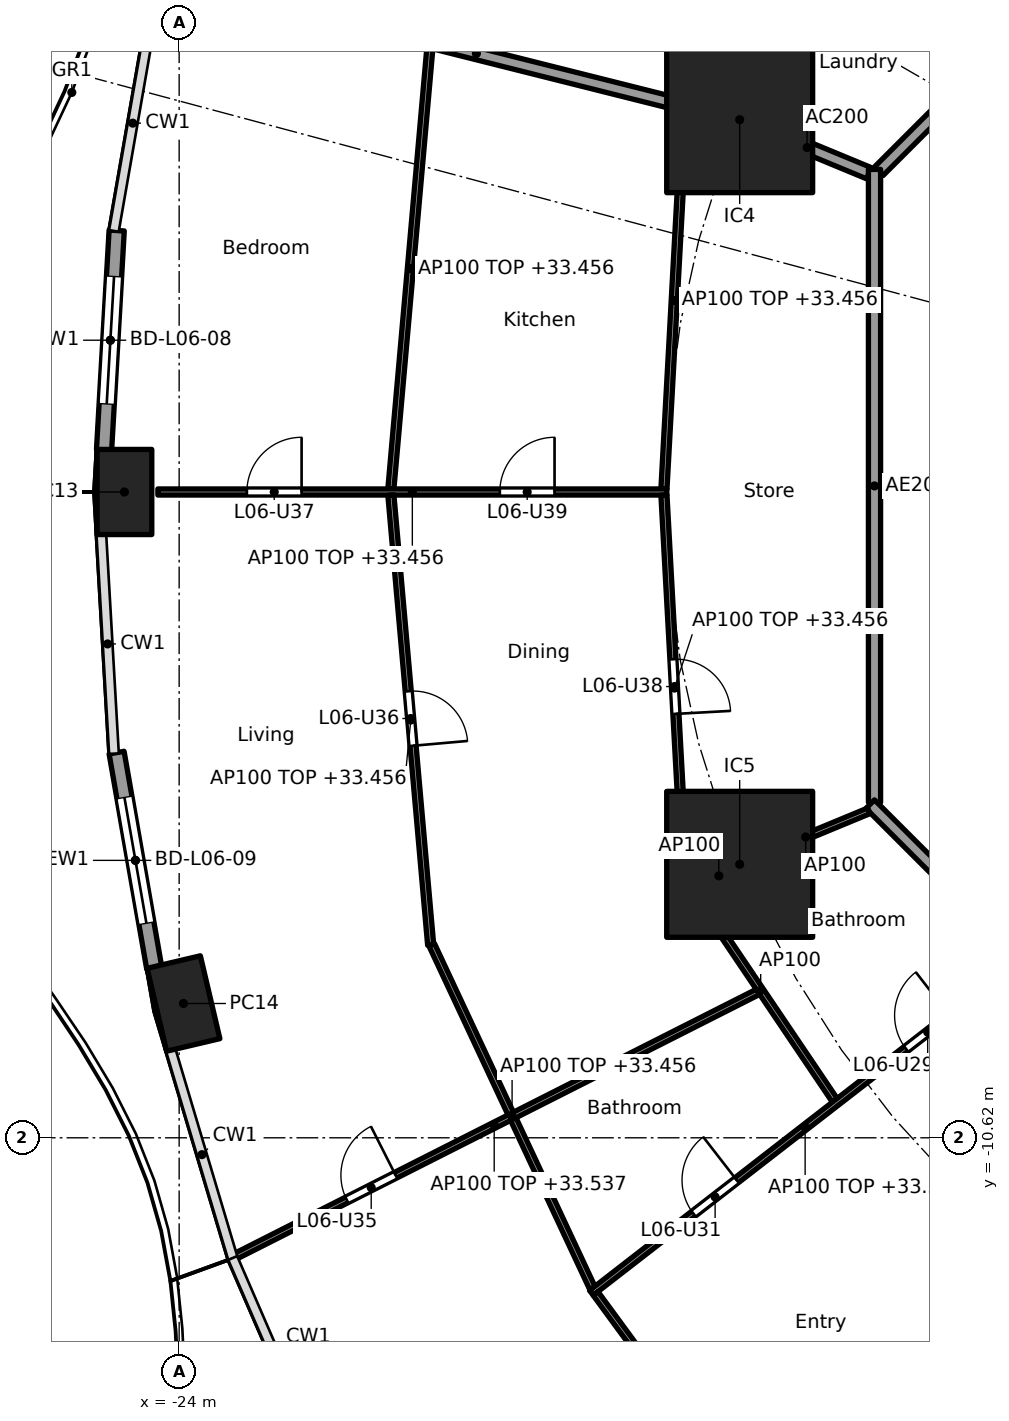
"""IFC4 building model, lengths in metres.
Left out: names, types, materials, properties, quantities, classifications, styles, units other than length and angle.
Written with IfcOpenShell. Run it as: python <this file> out.ifc"""

import sys

from ifc_helpers import new_model, si_unit, direction, frame, frame_2d, origin, origin_2d, place, context, subcontext, project, spatial, rectangle, hollow_rectangle, extrude, element, fill, save


model = new_model("IFC4")
c1 = context("Model", 3, precision=1e-05, world=origin(), true_north=direction((0.0, 1.0)))
c2 = subcontext(c1, "Body", "Model", "MODEL_VIEW")
j1 = project(units=[si_unit("LENGTHUNIT", "METRE"), si_unit("PLANEANGLEUNIT", "RADIAN")], contexts=[c1])
p1 = place(None, origin())
s1 = spatial("IfcSite", under=j1, at=p1, CompositionType="ELEMENT")
p2 = place(p1, origin())
s2 = spatial("IfcBuilding", under=s1, at=p2, CompositionType="ELEMENT")
p3 = place(p2, frame((0.0, 0.0, 30.7)))
s3 = spatial("IfcBuildingStorey", under=s2, at=p3, CompositionType="ELEMENT", Elevation=30.7)
for number, where, z_axis, x_axis in (
    (1, (-24.9, 0.0, 0.0), (0.0, 0.0, 1.0), (0.0, -1.0, 0.0)),
    (2, (-23.929, -8.412, 0.0), (0.0, 0.0, 1.0), (0.229, -0.973, 0.0)),
):
    element("IfcColumn", number, at=place(p3, frame(where, z_axis=z_axis, x_axis=x_axis)), inside=s3, PredefinedType="COLUMN", context=c2, shape_type="SweptSolid", body=[
        extrude(hollow_rectangle(XDim=1.4, YDim=0.9, WallThickness=0.05, at=origin_2d()), origin(), (0.0, 0.0, 1.0), 3.7),
    ])
for number, where, z_axis, x_axis in (
    (3, (-14.782, 6.123, 0.0), (0.0, 0.0, 1.0), (1.0, 0.0, 0.0)),
    (4, (-14.782, -6.123, 0.0), (0.0, 0.0, 1.0), (1.0, 0.0, 0.0)),
):
    element("IfcColumn", number, at=place(p3, frame(where, z_axis=z_axis, x_axis=x_axis)), inside=s3, PredefinedType="COLUMN", context=c2, shape_type="SweptSolid", body=[
        extrude(rectangle(XDim=2.4, YDim=2.4, at=origin_2d()), origin(), (0.0, 0.0, 1.0), 3.7),
    ])
p4 = place(p3, frame((-25.235, 0.692, 0.0), z_axis=(0.0, 0.0, 1.0), x_axis=(0.057478727308, 0.998346731305, 0.0)))
e5 = element("IfcWall", 5, at=p4, inside=s3, PredefinedType="SOLIDWALL", context=c2, shape_type="SweptSolid", body=[
    extrude(rectangle(XDim=3.615, YDim=0.25, at=frame_2d((1.807, 0.0))), origin(), (0.0, 0.0, 1.0), 3.44),
])
p5 = place(p4, frame((0.757, 0.0, 0.0)))
e6 = element("IfcOpeningElement", 6, at=p5, cuts=e5, PredefinedType="OPENING", context=c2, shape_type="SweptSolid", body=[
    extrude(rectangle(XDim=2.1, YDim=2.4, at=frame_2d((1.05, 1.2))), frame((0.0, 0.135, 0.0), z_axis=(0.0, -1.0, 0.0), x_axis=(1.0, 0.0, 0.0)), (0.0, 0.0, 1.0), 0.27),
])
p6 = place(p3, frame((-24.409, -7.83, 0.0), z_axis=(0.0, 0.0, 1.0), x_axis=(-0.172217377323, 0.98505897029, 0.0)))
e7 = element("IfcWall", 7, at=p6, inside=s3, PredefinedType="SOLIDWALL", context=c2, shape_type="SweptSolid", body=[
    extrude(rectangle(XDim=3.598, YDim=0.25, at=frame_2d((1.799, 0.0))), origin(), (0.0, 0.0, 1.0), 3.44),
])
p7 = place(p6, frame((0.749, 0.0, 0.0)))
e8 = element("IfcOpeningElement", 8, at=p7, cuts=e7, PredefinedType="OPENING", context=c2, shape_type="SweptSolid", body=[
    extrude(rectangle(XDim=2.1, YDim=2.4, at=frame_2d((1.05, 1.2))), frame((0.0, 0.135, 0.0), z_axis=(0.0, -1.0, 0.0), x_axis=(1.0, 0.0, 0.0)), (0.0, 0.0, 1.0), 0.27),
])
p8 = place(p3, frame((-12.657, 5.243, 0.0), z_axis=(0.0, 0.0, 1.0), x_axis=(-0.923885664896, 0.382668627144, 0.0)))
e9 = element("IfcWall", 9, at=p8, inside=s3, PredefinedType="PARTITIONING", context=c2, shape_type="SweptSolid", body=[
    extrude(rectangle(XDim=2.2, YDim=0.2, at=frame_2d((1.1, 0.0))), origin(), (0.0, 0.0, 1.0), 3.44),
])
p9 = place(p3, frame((-14.831, 6.135, 0.0), z_axis=(0.0, 0.0, 1.0), x_axis=(-0.969884949569, 0.243563512454, 0.0)))
e10 = element("IfcWall", 10, at=p9, inside=s3, PredefinedType="PARTITIONING", context=c2, shape_type="SweptSolid", body=[
    extrude(rectangle(XDim=8.829, YDim=0.2, at=frame_2d((4.415, 0.0))), origin(), (0.0, 0.0, 1.0), 2.756),
])
p10 = place(p3, frame((-5.275, 12.494, 0.0), z_axis=(0.0, 0.0, 1.0), x_axis=(-0.707106781187, -0.707106781187, 0.0)))
e11 = element("IfcWall", 11, at=p10, inside=s3, PredefinedType="PARTITIONING", context=c2, shape_type="SweptSolid", body=[
    extrude(rectangle(XDim=10.209, YDim=0.2, at=frame_2d((5.104, 0.0))), origin(), (0.0, 0.0, 1.0), 3.44),
])
p11 = place(p3, frame((-12.565, 5.304, 0.0), z_axis=(0.0, 0.0, 1.0), x_axis=(0.0, -1.0, 0.0)))
e12 = element("IfcWall", 12, at=p11, inside=s3, PredefinedType="PARTITIONING", context=c2, shape_type="SweptSolid", body=[
    extrude(rectangle(XDim=10.409, YDim=0.2, at=frame_2d((5.205, 0.0))), origin(), (0.0, 0.0, 1.0), 3.44),
])
p12 = place(p3, frame((-12.635, -5.134, 0.0), z_axis=(0.0, 0.0, 1.0), x_axis=(0.707106781187, -0.707106781187, 0.0)))
e13 = element("IfcWall", 13, at=p12, inside=s3, PredefinedType="PARTITIONING", context=c2, shape_type="SweptSolid", body=[
    extrude(rectangle(XDim=10.609, YDim=0.2, at=frame_2d((5.305, 0.0))), origin(), (0.0, 0.0, 1.0), 3.44),
])
p13 = place(p12, frame((4.804, 0.0, 0.0)))
e14 = element("IfcOpeningElement", 14, at=p13, cuts=e13, PredefinedType="OPENING", context=c2, shape_type="SweptSolid", body=[
    extrude(rectangle(XDim=1.0, YDim=2.1, at=frame_2d((0.5, 1.05))), frame((0.0, 0.11, 0.0), z_axis=(0.0, -1.0, 0.0), x_axis=(1.0, 0.0, 0.0)), (0.0, 0.0, 1.0), 0.22),
])
p14 = place(p3, frame((-13.218, 10.004, 0.0), z_axis=(0.0, 0.0, 1.0), x_axis=(-0.559112679527, -0.829091678641, 0.0)))
e15 = element("IfcWall", 15, at=p14, inside=s3, PredefinedType="PARTITIONING", context=c2, shape_type="SweptSolid", body=[
    extrude(rectangle(XDim=4.308, YDim=0.1, at=frame_2d((2.154, 0.0))), origin(), (0.0, 0.0, 1.0), 3.44),
])
p15 = place(p14, frame((1.433, 0.0, 0.0)))
e16 = element("IfcOpeningElement", 16, at=p15, cuts=e15, PredefinedType="OPENING", context=c2, shape_type="SweptSolid", body=[
    extrude(rectangle(XDim=0.9, YDim=2.1, at=frame_2d((0.45, 1.05))), frame((0.0, 0.06, 0.0), z_axis=(0.0, -1.0, 0.0), x_axis=(1.0, 0.0, 0.0)), (0.0, 0.0, 1.0), 0.12),
])
p16 = place(p3, frame((-15.688, 6.249, 0.0), z_axis=(0.0, 0.0, 1.0), x_axis=(-0.054659814056, -0.998505034903, 0.0)))
e17 = element("IfcWall", 17, at=p16, inside=s3, PredefinedType="PARTITIONING", context=c2, shape_type="SweptSolid", body=[
    extrude(rectangle(XDim=6.208, YDim=0.1, at=frame_2d((3.104, 0.0))), origin(), (0.0, 0.0, 1.0), 2.756),
])
p17 = place(p3, frame((-19.877, 7.301, 0.0), z_axis=(0.0, 0.0, 1.0), x_axis=(-0.088143415068, -0.996107794558, 0.0)))
e18 = element("IfcWall", 18, at=p17, inside=s3, PredefinedType="PARTITIONING", context=c2, shape_type="SweptSolid", body=[
    extrude(rectangle(XDim=7.279, YDim=0.1, at=frame_2d((3.64, 0.0))), origin(), (0.0, 0.0, 1.0), 2.756),
])
p18 = place(p3, frame((-15.98, 0.0, 0.0), z_axis=(0.0, 0.0, 1.0), x_axis=(-1.0, 0.0, 0.0)))
e19 = element("IfcWall", 19, at=p18, inside=s3, PredefinedType="PARTITIONING", context=c2, shape_type="SweptSolid", body=[
    extrude(rectangle(XDim=8.37, YDim=0.1, at=frame_2d((4.185, 0.0))), origin(), (0.0, 0.0, 1.0), 2.756),
])
p19 = place(p18, frame((6.006, 0.0, 0.0)))
e20 = element("IfcOpeningElement", 20, at=p19, cuts=e19, PredefinedType="OPENING", context=c2, shape_type="SweptSolid", body=[
    extrude(rectangle(XDim=0.9, YDim=2.1, at=frame_2d((0.45, 1.05))), frame((0.0, 0.06, 0.0), z_axis=(0.0, -1.0, 0.0), x_axis=(1.0, 0.0, 0.0)), (0.0, 0.0, 1.0), 0.12),
])
p20 = place(p18, frame((1.846, 0.0, 0.0)))
e21 = element("IfcOpeningElement", 21, at=p20, cuts=e19, PredefinedType="OPENING", context=c2, shape_type="SweptSolid", body=[
    extrude(rectangle(XDim=0.9, YDim=2.1, at=frame_2d((0.45, 1.05))), frame((0.0, 0.06, 0.0), z_axis=(0.0, -1.0, 0.0), x_axis=(1.0, 0.0, 0.0)), (0.0, 0.0, 1.0), 0.12),
])
p21 = place(p3, frame((-16.028, -0.05, 0.0), z_axis=(0.0, 0.0, 1.0), x_axis=(0.054636410342, -0.998506315786, 0.0)))
e22 = element("IfcWall", 22, at=p21, inside=s3, PredefinedType="PARTITIONING", context=c2, shape_type="SweptSolid", body=[
    extrude(rectangle(XDim=6.359, YDim=0.1, at=frame_2d((3.179, 0.0))), origin(), (0.0, 0.0, 1.0), 2.756),
])
p22 = place(p21, frame((2.704, 0.0, 0.0)))
e23 = element("IfcOpeningElement", 23, at=p22, cuts=e22, PredefinedType="OPENING", context=c2, shape_type="SweptSolid", body=[
    extrude(rectangle(XDim=0.9, YDim=2.1, at=frame_2d((0.45, 1.05))), frame((0.0, 0.06, 0.0), z_axis=(0.0, -1.0, 0.0), x_axis=(1.0, 0.0, 0.0)), (0.0, 0.0, 1.0), 0.12),
])
p23 = place(p3, frame((-20.518, -0.05, 0.0), z_axis=(0.0, 0.0, 1.0), x_axis=(0.088138375539, -0.996108240483, 0.0)))
e24 = element("IfcWall", 24, at=p23, inside=s3, PredefinedType="PARTITIONING", context=c2, shape_type="SweptSolid", body=[
    extrude(rectangle(XDim=7.429, YDim=0.1, at=frame_2d((3.714, 0.0))), origin(), (0.0, 0.0, 1.0), 2.756),
])
p24 = place(p23, frame((3.24, 0.0, 0.0)))
e25 = element("IfcOpeningElement", 25, at=p24, cuts=e24, PredefinedType="OPENING", context=c2, shape_type="SweptSolid", body=[
    extrude(rectangle(XDim=0.9, YDim=2.1, at=frame_2d((0.45, 1.05))), frame((0.0, 0.06, 0.0), z_axis=(0.0, -1.0, 0.0), x_axis=(1.0, 0.0, 0.0)), (0.0, 0.0, 1.0), 0.12),
])
p25 = place(p3, frame((-12.657, -5.243, 0.0), z_axis=(0.0, 0.0, 1.0), x_axis=(-0.923864733477, -0.382719158442, 0.0)))
e26 = element("IfcWall", 26, at=p25, inside=s3, PredefinedType="PARTITIONING", context=c2, shape_type="SweptSolid", body=[
    extrude(rectangle(XDim=2.25, YDim=0.1, at=frame_2d((1.125, 0.0))), origin(), (0.0, 0.0, 1.0), 3.44),
])
p26 = place(p3, frame((-15.655, -6.391, 0.0), z_axis=(0.0, 0.0, 1.0), x_axis=(0.559126445155, -0.82908239538, 0.0)))
e27 = element("IfcWall", 27, at=p26, inside=s3, PredefinedType="PARTITIONING", context=c2, shape_type="SweptSolid", body=[
    extrude(rectangle(XDim=4.358, YDim=0.1, at=frame_2d((2.179, 0.0))), origin(), (0.0, 0.0, 1.0), 3.44),
])
p27 = place(p3, frame((-19.847, -7.445, 0.0), z_axis=(0.0, 0.0, 1.0), x_axis=(0.423892287987, -0.905712607942, 0.0)))
e28 = element("IfcWall", 28, at=p27, inside=s3, PredefinedType="PARTITIONING", context=c2, shape_type="SweptSolid", body=[
    extrude(rectangle(XDim=6.238, YDim=0.1, at=frame_2d((3.119, 0.0))), origin(), (0.0, 0.0, 1.0), 2.756),
])
p28 = place(p3, frame((-14.481, -8.22, 0.0), z_axis=(0.0, 0.0, 1.0), x_axis=(-0.892232077638, -0.451577146935, 0.0)))
e29 = element("IfcWall", 29, at=p28, inside=s3, PredefinedType="PARTITIONING", context=c2, shape_type="SweptSolid", body=[
    extrude(rectangle(XDim=9.723, YDim=0.1, at=frame_2d((4.862, 0.0))), origin(), (0.0, 0.0, 1.0), 2.837),
])
p29 = place(p28, frame((6.678, 0.0, 0.0)))
e30 = element("IfcOpeningElement", 30, at=p29, cuts=e29, PredefinedType="OPENING", context=c2, shape_type="SweptSolid", body=[
    extrude(rectangle(XDim=0.9, YDim=2.1, at=frame_2d((0.45, 1.05))), frame((0.0, 0.06, 0.0), z_axis=(0.0, -1.0, 0.0), x_axis=(1.0, 0.0, 0.0)), (0.0, 0.0, 1.0), 0.12),
])
p30 = place(p3, frame((-10.19, -7.719, 0.0), z_axis=(0.0, 0.0, 1.0), x_axis=(-0.790264549439, -0.612765813259, 0.0)))
e31 = element("IfcWall", 31, at=p30, inside=s3, PredefinedType="PARTITIONING", context=c2, shape_type="SweptSolid", body=[
    extrude(rectangle(XDim=8.896, YDim=0.1, at=frame_2d((4.448, 0.0))), origin(), (0.0, 0.0, 1.0), 2.687),
])
p31 = place(p30, frame((1.448, 0.0, 0.0)))
e32 = element("IfcOpeningElement", 32, at=p31, cuts=e31, PredefinedType="OPENING", context=c2, shape_type="SweptSolid", body=[
    extrude(rectangle(XDim=0.9, YDim=2.1, at=frame_2d((0.45, 1.05))), frame((0.0, 0.06, 0.0), z_axis=(0.0, -1.0, 0.0), x_axis=(1.0, 0.0, 0.0)), (0.0, 0.0, 1.0), 0.12),
])
p32 = place(p30, frame((5.871, 0.0, 0.0)))
e33 = element("IfcOpeningElement", 33, at=p32, cuts=e31, PredefinedType="OPENING", context=c2, shape_type="SweptSolid", body=[
    extrude(rectangle(XDim=0.9, YDim=2.1, at=frame_2d((0.45, 1.05))), frame((0.0, 0.06, 0.0), z_axis=(0.0, -1.0, 0.0), x_axis=(1.0, 0.0, 0.0)), (0.0, 0.0, 1.0), 0.12),
])
p33 = place(p3, frame((-17.152, -13.18, 0.0), z_axis=(0.0, 0.0, 1.0), x_axis=(0.591222750954, -0.806508312886, 0.0)))
e34 = element("IfcWall", 34, at=p33, inside=s3, PredefinedType="PARTITIONING", context=c2, shape_type="SweptSolid", body=[
    extrude(rectangle(XDim=6.31, YDim=0.1, at=frame_2d((3.155, 0.0))), origin(), (0.0, 0.0, 1.0), 2.756),
])
p34 = place(p33, frame((2.705, 0.0, 0.0)))
e35 = element("IfcOpeningElement", 35, at=p34, cuts=e34, PredefinedType="OPENING", context=c2, shape_type="SweptSolid", body=[
    extrude(rectangle(XDim=0.9, YDim=2.1, at=frame_2d((0.45, 1.05))), frame((0.0, 0.06, 0.0), z_axis=(0.0, -1.0, 0.0), x_axis=(1.0, 0.0, 0.0)), (0.0, 0.0, 1.0), 0.12),
])
p35 = place(p3, frame((-7.715, -10.193, 0.0), z_axis=(0.0, 0.0, 1.0), x_axis=(-0.573126964124, -0.819466584428, 0.0)))
e36 = element("IfcWall", 36, at=p35, inside=s3, PredefinedType="PARTITIONING", context=c2, shape_type="SweptSolid", body=[
    extrude(rectangle(XDim=15.001, YDim=0.1, at=frame_2d((7.5, 0.0))), origin(), (0.0, 0.0, 1.0), 2.687),
])
p36 = place(p35, frame((1.678, 0.0, 0.0)))
e37 = element("IfcOpeningElement", 37, at=p36, cuts=e36, PredefinedType="OPENING", context=c2, shape_type="SweptSolid", body=[
    extrude(rectangle(XDim=0.9, YDim=2.1, at=frame_2d((0.45, 1.05))), frame((0.0, 0.06, 0.0), z_axis=(0.0, -1.0, 0.0), x_axis=(1.0, 0.0, 0.0)), (0.0, 0.0, 1.0), 0.12),
])
p37 = place(p35, frame((6.631, 0.0, 0.0)))
e38 = element("IfcOpeningElement", 38, at=p37, cuts=e36, PredefinedType="OPENING", context=c2, shape_type="SweptSolid", body=[
    extrude(rectangle(XDim=0.9, YDim=2.1, at=frame_2d((0.45, 1.05))), frame((0.0, 0.06, 0.0), z_axis=(0.0, -1.0, 0.0), x_axis=(1.0, 0.0, 0.0)), (0.0, 0.0, 1.0), 0.12),
])
p38 = place(p3, frame((-15.469, -6.398, 0.0), z_axis=(0.0, 0.0, 1.0), x_axis=(0.969858002632, 0.243670791706, 0.0)))
e39 = element("IfcWall", 39, at=p38, inside=s3, PredefinedType="PARTITIONING", context=c2, shape_type="SweptSolid", body=[
    extrude(rectangle(XDim=0.708, YDim=0.1, at=frame_2d((0.354, 0.0))), origin(), (0.0, 0.0, 1.0), 3.44),
])
p39 = place(p5, origin())
e40 = element("IfcDoor", 40, at=p39, inside=s3, OperationType="SLIDING_TO_LEFT", PredefinedType="DOOR", context=c2, shape_type="SweptSolid", body=[
    extrude(rectangle(XDim=2.1, YDim=2.4, at=frame_2d((1.05, 1.2))), frame((0.0, 0.025, 0.0), z_axis=(0.0, -1.0, 0.0), x_axis=(1.0, 0.0, 0.0)), (0.0, 0.0, 1.0), 0.05),
])
fill(e6, e40)
p40 = place(p7, origin())
e41 = element("IfcDoor", 41, at=p40, inside=s3, OperationType="SLIDING_TO_LEFT", PredefinedType="DOOR", context=c2, shape_type="SweptSolid", body=[
    extrude(rectangle(XDim=2.1, YDim=2.4, at=frame_2d((1.05, 1.2))), frame((0.0, 0.025, 0.0), z_axis=(0.0, -1.0, 0.0), x_axis=(1.0, 0.0, 0.0)), (0.0, 0.0, 1.0), 0.05),
])
fill(e8, e41)
p41 = place(p31, frame((0.9, 0.0, 0.0), x_axis=(-1.0, 0.0, 0.0)))
e42 = element("IfcDoor", 42, at=p41, inside=s3, OperationType="SINGLE_SWING_RIGHT", PredefinedType="DOOR", context=c2, shape_type="SweptSolid", body=[
    extrude(rectangle(XDim=0.9, YDim=2.1, at=frame_2d((0.45, 1.05))), frame((0.0, 0.025, 0.0), z_axis=(0.0, -1.0, 0.0), x_axis=(1.0, 0.0, 0.0)), (0.0, 0.0, 1.0), 0.05),
])
fill(e32, e42)
p42 = place(p32, frame((0.9, 0.0, 0.0), x_axis=(-1.0, 0.0, 0.0)))
e43 = element("IfcDoor", 43, at=p42, inside=s3, OperationType="SINGLE_SWING_RIGHT", PredefinedType="DOOR", context=c2, shape_type="SweptSolid", body=[
    extrude(rectangle(XDim=0.9, YDim=2.1, at=frame_2d((0.45, 1.05))), frame((0.0, 0.025, 0.0), z_axis=(0.0, -1.0, 0.0), x_axis=(1.0, 0.0, 0.0)), (0.0, 0.0, 1.0), 0.05),
])
fill(e33, e43)
p43 = place(p29, frame((0.9, 0.0, 0.0), x_axis=(-1.0, 0.0, 0.0)))
e44 = element("IfcDoor", 44, at=p43, inside=s3, OperationType="SINGLE_SWING_RIGHT", PredefinedType="DOOR", context=c2, shape_type="SweptSolid", body=[
    extrude(rectangle(XDim=0.9, YDim=2.1, at=frame_2d((0.45, 1.05))), frame((0.0, 0.025, 0.0), z_axis=(0.0, -1.0, 0.0), x_axis=(1.0, 0.0, 0.0)), (0.0, 0.0, 1.0), 0.05),
])
fill(e30, e44)
p44 = place(p24, origin())
e45 = element("IfcDoor", 45, at=p44, inside=s3, OperationType="SINGLE_SWING_RIGHT", PredefinedType="DOOR", context=c2, shape_type="SweptSolid", body=[
    extrude(rectangle(XDim=0.9, YDim=2.1, at=frame_2d((0.45, 1.05))), frame((0.0, 0.025, 0.0), z_axis=(0.0, -1.0, 0.0), x_axis=(1.0, 0.0, 0.0)), (0.0, 0.0, 1.0), 0.05),
])
fill(e25, e45)
p45 = place(p19, frame((0.9, 0.0, 0.0), x_axis=(-1.0, 0.0, 0.0)))
e46 = element("IfcDoor", 46, at=p45, inside=s3, OperationType="SINGLE_SWING_RIGHT", PredefinedType="DOOR", context=c2, shape_type="SweptSolid", body=[
    extrude(rectangle(XDim=0.9, YDim=2.1, at=frame_2d((0.45, 1.05))), frame((0.0, 0.025, 0.0), z_axis=(0.0, -1.0, 0.0), x_axis=(1.0, 0.0, 0.0)), (0.0, 0.0, 1.0), 0.05),
])
fill(e20, e46)
p46 = place(p22, origin())
e47 = element("IfcDoor", 47, at=p46, inside=s3, OperationType="SINGLE_SWING_RIGHT", PredefinedType="DOOR", context=c2, shape_type="SweptSolid", body=[
    extrude(rectangle(XDim=0.9, YDim=2.1, at=frame_2d((0.45, 1.05))), frame((0.0, 0.025, 0.0), z_axis=(0.0, -1.0, 0.0), x_axis=(1.0, 0.0, 0.0)), (0.0, 0.0, 1.0), 0.05),
])
fill(e23, e47)
p47 = place(p20, frame((0.9, 0.0, 0.0), x_axis=(-1.0, 0.0, 0.0)))
e48 = element("IfcDoor", 48, at=p47, inside=s3, OperationType="SINGLE_SWING_RIGHT", PredefinedType="DOOR", context=c2, shape_type="SweptSolid", body=[
    extrude(rectangle(XDim=0.9, YDim=2.1, at=frame_2d((0.45, 1.05))), frame((0.0, 0.025, 0.0), z_axis=(0.0, -1.0, 0.0), x_axis=(1.0, 0.0, 0.0)), (0.0, 0.0, 1.0), 0.05),
])
fill(e21, e48)
save(model, sys.argv[1])
